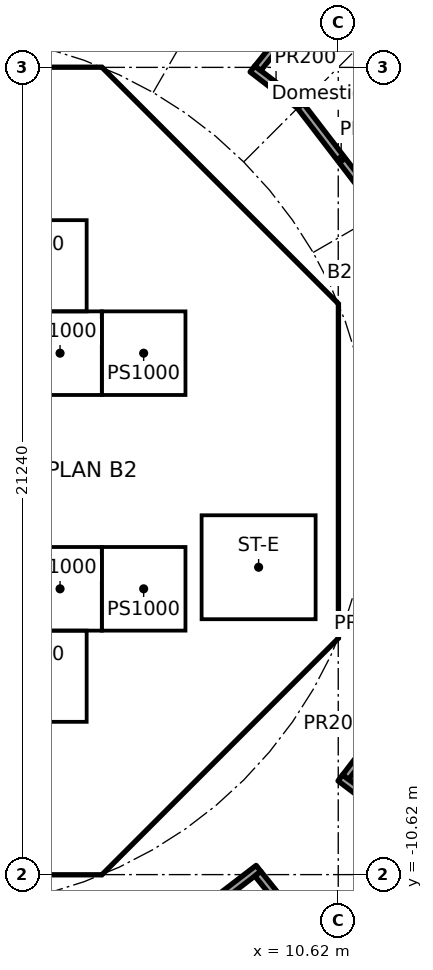
"""IFC4 building model, lengths in metres.
Left out: names, types, materials, properties, quantities, classifications, styles, units other than length and angle.
Written with IfcOpenShell. Run it as: python <this file> out.ifc"""

import sys

from ifc_helpers import new_model, si_unit, direction, frame, frame_2d, origin, place, context, subcontext, project, spatial, polyline, rectangle, outline, extrude, element, fill, save


model = new_model("IFC4")
c1 = context("Model", 3, precision=1e-05, world=origin(), true_north=direction((0.0, 1.0)))
c2 = subcontext(c1, "Body", "Model", "MODEL_VIEW")
j1 = project(units=[si_unit("LENGTHUNIT", "METRE"), si_unit("PLANEANGLEUNIT", "RADIAN")], contexts=[c1])
p1 = place(None, origin())
s1 = spatial("IfcSite", under=j1, at=p1, CompositionType="ELEMENT")
p2 = place(p1, origin())
s2 = spatial("IfcBuilding", under=s1, at=p2, CompositionType="ELEMENT")
p3 = place(p2, frame((0.0, 0.0, -10.0)))
s3 = spatial("IfcBuildingStorey", under=s2, at=p3, CompositionType="ELEMENT", Elevation=-10.0)
p4 = place(p3, frame((9.988, 4.613, 0.0), z_axis=(0.0, 0.0, 1.0), x_axis=(-0.707106781187, 0.707106781187, 0.0)))
e1 = element("IfcWall", 1, at=p4, inside=s3, PredefinedType="SHEAR", context=c2, shape_type="SweptSolid", body=[
    extrude(rectangle(XDim=7.602, YDim=0.6, at=frame_2d((3.801, 0.0))), origin(), (0.0, 0.0, 1.0), 4.6),
])
p5 = place(p4, frame((3.201, 0.0, 0.0)))
e2 = element("IfcOpeningElement", 2, at=p5, cuts=e1, PredefinedType="OPENING", context=c2, shape_type="SweptSolid", body=[
    extrude(rectangle(XDim=1.2, YDim=2.1, at=frame_2d((0.6, 1.05))), frame((0.0, 0.31, 0.0), z_axis=(0.0, -1.0, 0.0), x_axis=(1.0, 0.0, 0.0)), (0.0, 0.0, 1.0), 0.62),
])
p6 = place(p3, frame((4.613, -9.988, 0.0), z_axis=(0.0, 0.0, 1.0), x_axis=(0.707106781187, 0.707106781187, 0.0)))
e3 = element("IfcWall", 3, at=p6, inside=s3, PredefinedType="SHEAR", context=c2, shape_type="SweptSolid", body=[
    extrude(rectangle(XDim=7.602, YDim=0.6, at=frame_2d((3.801, 0.0))), origin(), (0.0, 0.0, 1.0), 4.6),
])
p7 = place(p6, frame((3.201, 0.0, 0.0)))
e4 = element("IfcOpeningElement", 4, at=p7, cuts=e3, PredefinedType="OPENING", context=c2, shape_type="SweptSolid", body=[
    extrude(rectangle(XDim=1.2, YDim=2.1, at=frame_2d((0.6, 1.05))), frame((0.0, 0.31, 0.0), z_axis=(0.0, -1.0, 0.0), x_axis=(1.0, 0.0, 0.0)), (0.0, 0.0, 1.0), 0.62),
])
p8 = place(p3, frame((4.0, 4.3, 0.0), z_axis=(0.0, 0.0, 1.0), x_axis=(0.0, 1.0, 0.0)))
e5 = element("IfcWall", 5, at=p8, inside=s3, PredefinedType="SOLIDWALL", context=c2, shape_type="SweptSolid", body=[
    extrude(rectangle(XDim=2.2, YDim=0.2, at=frame_2d((1.1, 0.0))), origin(), (0.0, 0.0, 1.0), 4.6),
])
p9 = place(p8, frame((0.55, 0.0, 0.0)))
e6 = element("IfcOpeningElement", 6, at=p9, cuts=e5, PredefinedType="OPENING", context=c2, shape_type="SweptSolid", body=[
    extrude(rectangle(XDim=1.1, YDim=2.1, at=frame_2d((0.55, 1.05))), frame((0.0, 0.11, 0.0), z_axis=(0.0, -1.0, 0.0), x_axis=(1.0, 0.0, 0.0)), (0.0, 0.0, 1.0), 0.22),
])
p10 = place(p3, frame((-6.7, 2.0, 0.0), z_axis=(0.0, 0.0, 1.0), x_axis=(1.0, 0.0, 0.0)))
e7 = element("IfcWall", 7, at=p10, inside=s3, PredefinedType="SOLIDWALL", context=c2, shape_type="SweptSolid", body=[
    extrude(rectangle(XDim=13.4, YDim=0.2, at=frame_2d((6.7, 0.0))), origin(), (0.0, 0.0, 1.0), 4.6),
])
p11 = place(p10, frame((0.65, 0.0, 0.0)))
e8 = element("IfcOpeningElement", 8, at=p11, cuts=e7, PredefinedType="OPENING", context=c2, shape_type="SweptSolid", body=[
    extrude(rectangle(XDim=1.1, YDim=2.1, at=frame_2d((0.55, 1.05))), frame((0.0, 0.11, 0.0), z_axis=(0.0, -1.0, 0.0), x_axis=(1.0, 0.0, 0.0)), (0.0, 0.0, 1.0), 0.22),
])
p12 = place(p10, frame((2.85, 0.0, 0.0)))
e9 = element("IfcOpeningElement", 9, at=p12, cuts=e7, PredefinedType="OPENING", context=c2, shape_type="SweptSolid", body=[
    extrude(rectangle(XDim=1.1, YDim=2.1, at=frame_2d((0.55, 1.05))), frame((0.0, 0.11, 0.0), z_axis=(0.0, -1.0, 0.0), x_axis=(1.0, 0.0, 0.0)), (0.0, 0.0, 1.0), 0.22),
])
p13 = place(p10, frame((5.05, 0.0, 0.0)))
e10 = element("IfcOpeningElement", 10, at=p13, cuts=e7, PredefinedType="OPENING", context=c2, shape_type="SweptSolid", body=[
    extrude(rectangle(XDim=1.1, YDim=2.1, at=frame_2d((0.55, 1.05))), frame((0.0, 0.11, 0.0), z_axis=(0.0, -1.0, 0.0), x_axis=(1.0, 0.0, 0.0)), (0.0, 0.0, 1.0), 0.22),
])
p14 = place(p10, frame((7.25, 0.0, 0.0)))
e11 = element("IfcOpeningElement", 11, at=p14, cuts=e7, PredefinedType="OPENING", context=c2, shape_type="SweptSolid", body=[
    extrude(rectangle(XDim=1.1, YDim=2.1, at=frame_2d((0.55, 1.05))), frame((0.0, 0.11, 0.0), z_axis=(0.0, -1.0, 0.0), x_axis=(1.0, 0.0, 0.0)), (0.0, 0.0, 1.0), 0.22),
])
p15 = place(p10, frame((9.45, 0.0, 0.0)))
e12 = element("IfcOpeningElement", 12, at=p15, cuts=e7, PredefinedType="OPENING", context=c2, shape_type="SweptSolid", body=[
    extrude(rectangle(XDim=1.1, YDim=2.1, at=frame_2d((0.55, 1.05))), frame((0.0, 0.11, 0.0), z_axis=(0.0, -1.0, 0.0), x_axis=(1.0, 0.0, 0.0)), (0.0, 0.0, 1.0), 0.22),
])
p16 = place(p10, frame((11.65, 0.0, 0.0)))
e13 = element("IfcOpeningElement", 13, at=p16, cuts=e7, PredefinedType="OPENING", context=c2, shape_type="SweptSolid", body=[
    extrude(rectangle(XDim=1.1, YDim=2.1, at=frame_2d((0.55, 1.05))), frame((0.0, 0.11, 0.0), z_axis=(0.0, -1.0, 0.0), x_axis=(1.0, 0.0, 0.0)), (0.0, 0.0, 1.0), 0.22),
])
p17 = place(p3, frame((6.7, 4.0, 0.0), z_axis=(0.0, 0.0, 1.0), x_axis=(1.0, 0.0, 0.0)))
e14 = element("IfcWall", 14, at=p17, inside=s3, PredefinedType="SOLIDWALL", context=c2, shape_type="SweptSolid", body=[
    extrude(rectangle(XDim=3.325, YDim=0.2, at=frame_2d((1.662, 0.0))), origin(), (0.0, 0.0, 1.0), 4.6),
])
p18 = place(p17, frame((1.25, 0.0, 0.0)))
e15 = element("IfcOpeningElement", 15, at=p18, cuts=e14, PredefinedType="OPENING", context=c2, shape_type="SweptSolid", body=[
    extrude(rectangle(XDim=1.1, YDim=2.1, at=frame_2d((0.55, 1.05))), frame((0.0, 0.11, 0.0), z_axis=(0.0, -1.0, 0.0), x_axis=(1.0, 0.0, 0.0)), (0.0, 0.0, 1.0), 0.22),
])
p19 = place(p3, frame((4.0, 7.025, 0.0), z_axis=(0.0, 0.0, 1.0), x_axis=(0.0, 1.0, 0.0)))
e16 = element("IfcWall", 16, at=p19, inside=s3, PredefinedType="SOLIDWALL", context=c2, shape_type="SweptSolid", body=[
    extrude(rectangle(XDim=3.0, YDim=0.2, at=frame_2d((1.5, 0.0))), origin(), (0.0, 0.0, 1.0), 4.6),
])
p20 = place(p19, frame((0.925, 0.0, 0.0)))
e17 = element("IfcOpeningElement", 17, at=p20, cuts=e16, PredefinedType="OPENING", context=c2, shape_type="SweptSolid", body=[
    extrude(rectangle(XDim=1.1, YDim=2.1, at=frame_2d((0.55, 1.05))), frame((0.0, 0.11, 0.0), z_axis=(0.0, -1.0, 0.0), x_axis=(1.0, 0.0, 0.0)), (0.0, 0.0, 1.0), 0.22),
])
p21 = place(p3, frame((4.0, -10.025, 0.0), z_axis=(0.0, 0.0, 1.0), x_axis=(0.0, 1.0, 0.0)))
e18 = element("IfcWall", 18, at=p21, inside=s3, PredefinedType="SOLIDWALL", context=c2, shape_type="SweptSolid", body=[
    extrude(rectangle(XDim=3.0, YDim=0.2, at=frame_2d((1.5, 0.0))), origin(), (0.0, 0.0, 1.0), 4.6),
])
p22 = place(p21, frame((0.975, 0.0, 0.0)))
e19 = element("IfcOpeningElement", 19, at=p22, cuts=e18, PredefinedType="OPENING", context=c2, shape_type="SweptSolid", body=[
    extrude(rectangle(XDim=1.1, YDim=2.1, at=frame_2d((0.55, 1.05))), frame((0.0, 0.11, 0.0), z_axis=(0.0, -1.0, 0.0), x_axis=(1.0, 0.0, 0.0)), (0.0, 0.0, 1.0), 0.22),
])
p23 = place(p3, frame((4.0, -6.5, 0.0), z_axis=(0.0, 0.0, 1.0), x_axis=(0.0, 1.0, 0.0)))
e20 = element("IfcWall", 20, at=p23, inside=s3, PredefinedType="SOLIDWALL", context=c2, shape_type="SweptSolid", body=[
    extrude(rectangle(XDim=2.2, YDim=0.2, at=frame_2d((1.1, 0.0))), origin(), (0.0, 0.0, 1.0), 4.6),
])
p24 = place(p23, frame((0.55, 0.0, 0.0)))
e21 = element("IfcOpeningElement", 21, at=p24, cuts=e20, PredefinedType="OPENING", context=c2, shape_type="SweptSolid", body=[
    extrude(rectangle(XDim=1.1, YDim=2.1, at=frame_2d((0.55, 1.05))), frame((0.0, 0.11, 0.0), z_axis=(0.0, -1.0, 0.0), x_axis=(1.0, 0.0, 0.0)), (0.0, 0.0, 1.0), 0.22),
])
p25 = place(p3, frame((-6.7, -2.0, 0.0), z_axis=(0.0, 0.0, 1.0), x_axis=(1.0, 0.0, 0.0)))
e22 = element("IfcWall", 22, at=p25, inside=s3, PredefinedType="SOLIDWALL", context=c2, shape_type="SweptSolid", body=[
    extrude(rectangle(XDim=13.4, YDim=0.2, at=frame_2d((6.7, 0.0))), origin(), (0.0, 0.0, 1.0), 4.6),
])
p26 = place(p25, frame((0.65, 0.0, 0.0)))
e23 = element("IfcOpeningElement", 23, at=p26, cuts=e22, PredefinedType="OPENING", context=c2, shape_type="SweptSolid", body=[
    extrude(rectangle(XDim=1.1, YDim=2.1, at=frame_2d((0.55, 1.05))), frame((0.0, 0.11, 0.0), z_axis=(0.0, -1.0, 0.0), x_axis=(1.0, 0.0, 0.0)), (0.0, 0.0, 1.0), 0.22),
])
p27 = place(p25, frame((2.85, 0.0, 0.0)))
e24 = element("IfcOpeningElement", 24, at=p27, cuts=e22, PredefinedType="OPENING", context=c2, shape_type="SweptSolid", body=[
    extrude(rectangle(XDim=1.1, YDim=2.1, at=frame_2d((0.55, 1.05))), frame((0.0, 0.11, 0.0), z_axis=(0.0, -1.0, 0.0), x_axis=(1.0, 0.0, 0.0)), (0.0, 0.0, 1.0), 0.22),
])
p28 = place(p25, frame((5.05, 0.0, 0.0)))
e25 = element("IfcOpeningElement", 25, at=p28, cuts=e22, PredefinedType="OPENING", context=c2, shape_type="SweptSolid", body=[
    extrude(rectangle(XDim=1.1, YDim=2.1, at=frame_2d((0.55, 1.05))), frame((0.0, 0.11, 0.0), z_axis=(0.0, -1.0, 0.0), x_axis=(1.0, 0.0, 0.0)), (0.0, 0.0, 1.0), 0.22),
])
p29 = place(p25, frame((7.25, 0.0, 0.0)))
e26 = element("IfcOpeningElement", 26, at=p29, cuts=e22, PredefinedType="OPENING", context=c2, shape_type="SweptSolid", body=[
    extrude(rectangle(XDim=1.1, YDim=2.1, at=frame_2d((0.55, 1.05))), frame((0.0, 0.11, 0.0), z_axis=(0.0, -1.0, 0.0), x_axis=(1.0, 0.0, 0.0)), (0.0, 0.0, 1.0), 0.22),
])
p30 = place(p25, frame((9.45, 0.0, 0.0)))
e27 = element("IfcOpeningElement", 27, at=p30, cuts=e22, PredefinedType="OPENING", context=c2, shape_type="SweptSolid", body=[
    extrude(rectangle(XDim=1.1, YDim=2.1, at=frame_2d((0.55, 1.05))), frame((0.0, 0.11, 0.0), z_axis=(0.0, -1.0, 0.0), x_axis=(1.0, 0.0, 0.0)), (0.0, 0.0, 1.0), 0.22),
])
p31 = place(p25, frame((11.65, 0.0, 0.0)))
e28 = element("IfcOpeningElement", 28, at=p31, cuts=e22, PredefinedType="OPENING", context=c2, shape_type="SweptSolid", body=[
    extrude(rectangle(XDim=1.1, YDim=2.1, at=frame_2d((0.55, 1.05))), frame((0.0, 0.11, 0.0), z_axis=(0.0, -1.0, 0.0), x_axis=(1.0, 0.0, 0.0)), (0.0, 0.0, 1.0), 0.22),
])
p32 = place(p3, origin())
e29 = element("IfcWall", 29, at=p32, inside=s3, PredefinedType="SHEAR", context=c2, shape_type="SweptSolid", body=[
    extrude(outline(polyline([(-4.152, -10.025), (4.152, -10.025), (4.401, -9.776), (4.825, -10.2), (4.401, -10.625), (-4.401, -10.625), (-4.825, -10.2), (-4.401, -9.776), (-4.152, -10.025)])), origin(), (0.0, 0.0, 1.0), 4.6),
])
p33 = place(p3, origin())
e30 = element("IfcWall", 30, at=p33, inside=s3, PredefinedType="SHEAR", context=c2, shape_type="SweptSolid", body=[
    extrude(outline(polyline([(-4.152, 10.025), (-4.401, 9.776), (-4.825, 10.2), (-4.401, 10.625), (4.401, 10.625), (4.825, 10.2), (4.401, 9.776), (4.152, 10.025), (-4.152, 10.025)])), origin(), (0.0, 0.0, 1.0), 4.6),
])
p34 = place(p3, origin())
e31 = element("IfcWall", 31, at=p34, inside=s3, PredefinedType="SHEAR", context=c2, shape_type="SweptSolid", body=[
    extrude(outline(polyline([(9.776, -4.401), (10.025, -4.152), (10.025, -3.801), (10.025, 4.152), (9.776, 4.401), (10.2, 4.825), (10.625, 4.401), (10.625, -4.401), (10.2, -4.825), (9.776, -4.401)])), origin(), (0.0, 0.0, 1.0), 4.6),
])
p35 = place(p3, origin())
e32 = element("IfcWall", 32, at=p35, inside=s3, PredefinedType="SOLIDWALL", context=c2, shape_type="SweptSolid", body=[
    extrude(outline(polyline([(-6.7, -2.1), (-6.5, -2.1), (-6.5, -4.1), (-4.5, -4.1), (-4.5, -2.1), (-4.3, -2.1), (-4.3, -4.1), (-2.3, -4.1), (-2.3, -2.1), (-2.1, -2.1), (-2.1, -4.1), (-0.1, -4.1), (-0.1, -2.1), (0.1, -2.1), (0.1, -4.1), (2.1, -4.1), (2.1, -2.1), (2.3, -2.1), (2.3, -4.1), (4.3, -4.1), (4.3, -2.1), (4.5, -2.1), (4.5, -4.1), (6.5, -4.1), (6.5, -2.1), (6.7, -2.1), (6.7, -4.3), (-6.7, -4.3), (-6.7, -2.1)])), origin(), (0.0, 0.0, 1.0), 4.6),
])
p36 = place(p3, origin())
e33 = element("IfcWall", 33, at=p36, inside=s3, PredefinedType="SOLIDWALL", context=c2, shape_type="SweptSolid", body=[
    extrude(outline(polyline([(-6.5, 2.1), (-6.7, 2.1), (-6.7, 4.3), (6.7, 4.3), (6.7, 2.1), (6.5, 2.1), (6.5, 4.1), (4.5, 4.1), (4.5, 2.1), (4.3, 2.1), (4.3, 4.1), (2.3, 4.1), (2.3, 2.1), (2.1, 2.1), (2.1, 4.1), (0.1, 4.1), (0.1, 2.1), (-0.1, 2.1), (-0.1, 4.1), (-2.1, 4.1), (-2.1, 2.1), (-2.3, 2.1), (-2.3, 4.1), (-4.3, 4.1), (-4.3, 2.1), (-4.5, 2.1), (-4.5, 4.1), (-6.5, 4.1), (-6.5, 2.1)])), origin(), (0.0, 0.0, 1.0), 4.6),
])
p37 = place(p3, origin())
e34 = element("IfcWall", 34, at=p37, inside=s3, PredefinedType="SOLIDWALL", context=c2, shape_type="SweptSolid", body=[
    extrude(outline(polyline([(4.1, -7.025), (-4.1, -7.025), (-4.1, -6.5), (4.1, -6.5), (4.1, -7.025)])), origin(), (0.0, 0.0, 1.0), 4.6),
])
p38 = place(p3, origin())
e35 = element("IfcWall", 35, at=p38, inside=s3, PredefinedType="SOLIDWALL", context=c2, shape_type="SweptSolid", body=[
    extrude(outline(polyline([(4.1, 6.5), (-4.1, 6.5), (-4.1, 7.025), (4.1, 7.025), (4.1, 6.5)])), origin(), (0.0, 0.0, 1.0), 4.6),
])
p39 = place(p3, origin())
e36 = element("IfcWall", 36, at=p39, inside=s3, PredefinedType="SOLIDWALL", context=c2, shape_type="SweptSolid", body=[
    extrude(outline(polyline([(7.025, -3.9), (6.7, -3.9), (6.7, 3.9), (7.025, 3.9), (7.025, -3.9)])), origin(), (0.0, 0.0, 1.0), 4.6),
])
p40 = place(p3, origin())
e37 = element("IfcWall", 37, at=p40, inside=s3, PredefinedType="SOLIDWALL", context=c2, shape_type="SweptSolid", body=[
    extrude(outline(polyline([(10.025, -4.1), (6.7, -4.1), (6.7, -3.9), (10.025, -3.9), (10.025, -4.1)])), origin(), (0.0, 0.0, 1.0), 4.6),
])
p41 = place(p3, frame((0.0, 0.0, -2.0)))
e38 = element("IfcWall", 38, at=p41, inside=s3, PredefinedType="SOLIDWALL", context=c2, shape_type="SweptSolid", body=[
    extrude(outline(polyline([(4.4, 2.0), (2.2, 2.0), (2.2, 4.2), (4.4, 4.2), (4.4, 2.0)]), holes=[polyline([(4.3, 2.1), (4.3, 4.1), (2.3, 4.1), (2.3, 2.1), (4.3, 2.1)])]), origin(), (0.0, 0.0, 1.0), 2.0),
])
p42 = place(p3, frame((0.0, 0.0, -2.0)))
e39 = element("IfcWall", 39, at=p42, inside=s3, PredefinedType="SOLIDWALL", context=c2, shape_type="SweptSolid", body=[
    extrude(outline(polyline([(6.6, 2.0), (4.4, 2.0), (4.4, 4.2), (6.6, 4.2), (6.6, 2.0)]), holes=[polyline([(6.5, 2.1), (6.5, 4.1), (4.5, 4.1), (4.5, 2.1), (6.5, 2.1)])]), origin(), (0.0, 0.0, 1.0), 2.0),
])
p43 = place(p3, frame((0.0, 0.0, -2.0)))
e40 = element("IfcWall", 40, at=p43, inside=s3, PredefinedType="SOLIDWALL", context=c2, shape_type="SweptSolid", body=[
    extrude(outline(polyline([(4.4, -4.2), (2.2, -4.2), (2.2, -2.0), (4.4, -2.0), (4.4, -4.2)]), holes=[polyline([(4.3, -4.1), (4.3, -2.1), (2.3, -2.1), (2.3, -4.1), (4.3, -4.1)])]), origin(), (0.0, 0.0, 1.0), 2.0),
])
p44 = place(p3, frame((0.0, 0.0, -2.0)))
e41 = element("IfcWall", 41, at=p44, inside=s3, PredefinedType="SOLIDWALL", context=c2, shape_type="SweptSolid", body=[
    extrude(outline(polyline([(6.6, -4.2), (4.4, -4.2), (4.4, -2.0), (6.6, -2.0), (6.6, -4.2)]), holes=[polyline([(6.5, -4.1), (6.5, -2.1), (4.5, -2.1), (4.5, -4.1), (6.5, -4.1)])]), origin(), (0.0, 0.0, 1.0), 2.0),
])
p45 = place(p3, frame((0.0, 0.0, -2.0)))
e42 = element("IfcWall", 42, at=p45, inside=s3, PredefinedType="SOLIDWALL", context=c2, shape_type="SweptSolid", body=[
    extrude(outline(polyline([(4.0, 4.2), (0.9, 4.2), (0.9, 6.6), (4.0, 6.6), (4.0, 4.2)]), holes=[polyline([(3.9, 4.3), (3.9, 6.5), (1.0, 6.5), (1.0, 4.3), (3.9, 4.3)])]), origin(), (0.0, 0.0, 1.0), 2.0),
])
p46 = place(p3, frame((0.0, 0.0, -2.0)))
e43 = element("IfcWall", 43, at=p46, inside=s3, PredefinedType="SOLIDWALL", context=c2, shape_type="SweptSolid", body=[
    extrude(outline(polyline([(4.0, -6.6), (0.9, -6.6), (0.9, -4.2), (4.0, -4.2), (4.0, -6.6)]), holes=[polyline([(3.9, -6.5), (3.9, -4.3), (1.0, -4.3), (1.0, -6.5), (3.9, -6.5)])]), origin(), (0.0, 0.0, 1.0), 2.0),
])
p47 = place(p3, frame((8.521, -10.457, 0.0), z_axis=(0.0, 0.0, 1.0), x_axis=(-0.793411148419, -0.608686084582, 0.0)))
e44 = element("IfcWall", 44, at=p47, inside=s3, PredefinedType="PARTITIONING", context=c2, shape_type="SweptSolid", body=[
    extrude(rectangle(XDim=2.154, YDim=0.2, at=frame_2d((1.077, 0.0))), origin(), (0.0, 0.0, 1.0), 4.6),
])
p48 = place(p3, frame((8.363, 10.579, 0.0), z_axis=(0.0, 0.0, 1.0), x_axis=(0.793365367908, -0.608745753992, 0.0)))
e45 = element("IfcWall", 45, at=p48, inside=s3, PredefinedType="PARTITIONING", context=c2, shape_type="SweptSolid", body=[
    extrude(rectangle(XDim=1.566, YDim=0.2, at=frame_2d((0.783, 0.0))), origin(), (0.0, 0.0, 1.0), 4.6),
])
p49 = place(p3, frame((9.626, 9.605, 0.0), z_axis=(0.0, 0.0, 1.0), x_axis=(0.608697977542, -0.793402024283, 0.0)))
e46 = element("IfcWall", 46, at=p49, inside=s3, PredefinedType="PARTITIONING", context=c2, shape_type="SweptSolid", body=[
    extrude(rectangle(XDim=3.52, YDim=0.2, at=frame_2d((1.76, 0.0))), origin(), (0.0, 0.0, 1.0), 4.6),
])
p50 = place(p3, frame((10.675, -8.073, 0.0), z_axis=(0.0, 0.0, 1.0), x_axis=(0.797578930951, -0.603214596062, 0.0)))
e47 = element("IfcWall", 47, at=p50, inside=s3, PredefinedType="PARTITIONING", context=c2, shape_type="SweptSolid", body=[
    extrude(rectangle(XDim=6.2, YDim=0.2, at=frame_2d((3.1, 0.0))), origin(), (0.0, 0.0, 1.0), 4.6),
])
p51 = place(p3, frame((11.769, -6.812, 0.0), z_axis=(0.0, 0.0, 1.0), x_axis=(-0.608670453571, -0.793423139913, 0.0)))
e48 = element("IfcWall", 48, at=p51, inside=s3, PredefinedType="PARTITIONING", context=c2, shape_type="SweptSolid", body=[
    extrude(rectangle(XDim=1.566, YDim=0.2, at=frame_2d((0.783, 0.0))), origin(), (0.0, 0.0, 1.0), 4.6),
])
p52 = place(p3, frame((12.136, -15.121, 0.0), z_axis=(0.0, 0.0, 1.0), x_axis=(-0.625936206577, 0.779874262491, 0.0)))
e49 = element("IfcWall", 49, at=p52, inside=s3, PredefinedType="PARTITIONING", context=c2, shape_type="SweptSolid", body=[
    extrude(rectangle(XDim=5.802, YDim=0.2, at=frame_2d((2.901, 0.0))), origin(), (0.0, 0.0, 1.0), 4.6),
])
p53 = place(p3, frame((12.261, 15.277, 0.0), z_axis=(0.0, 0.0, 1.0), x_axis=(-0.625939450801, -0.779871658628, 0.0)))
e50 = element("IfcWall", 50, at=p53, inside=s3, PredefinedType="PARTITIONING", context=c2, shape_type="SweptSolid", body=[
    extrude(rectangle(XDim=6.001, YDim=0.2, at=frame_2d((3.001, 0.0))), origin(), (0.0, 0.0, 1.0), 4.6),
])
p54 = place(p15, origin())
e51 = element("IfcDoor", 51, at=p54, inside=s3, OperationType="DOUBLE_DOOR_SLIDING", PredefinedType="DOOR", context=c2, shape_type="SweptSolid", body=[
    extrude(rectangle(XDim=1.1, YDim=2.1, at=frame_2d((0.55, 1.05))), frame((0.0, 0.025, 0.0), z_axis=(0.0, -1.0, 0.0), x_axis=(1.0, 0.0, 0.0)), (0.0, 0.0, 1.0), 0.05),
])
fill(e12, e51)
p55 = place(p16, origin())
e52 = element("IfcDoor", 52, at=p55, inside=s3, OperationType="DOUBLE_DOOR_SLIDING", PredefinedType="DOOR", context=c2, shape_type="SweptSolid", body=[
    extrude(rectangle(XDim=1.1, YDim=2.1, at=frame_2d((0.55, 1.05))), frame((0.0, 0.025, 0.0), z_axis=(0.0, -1.0, 0.0), x_axis=(1.0, 0.0, 0.0)), (0.0, 0.0, 1.0), 0.05),
])
fill(e13, e52)
p56 = place(p30, origin())
e53 = element("IfcDoor", 53, at=p56, inside=s3, OperationType="DOUBLE_DOOR_SLIDING", PredefinedType="DOOR", context=c2, shape_type="SweptSolid", body=[
    extrude(rectangle(XDim=1.1, YDim=2.1, at=frame_2d((0.55, 1.05))), frame((0.0, 0.025, 0.0), z_axis=(0.0, -1.0, 0.0), x_axis=(1.0, 0.0, 0.0)), (0.0, 0.0, 1.0), 0.05),
])
fill(e27, e53)
p57 = place(p31, origin())
e54 = element("IfcDoor", 54, at=p57, inside=s3, OperationType="DOUBLE_DOOR_SLIDING", PredefinedType="DOOR", context=c2, shape_type="SweptSolid", body=[
    extrude(rectangle(XDim=1.1, YDim=2.1, at=frame_2d((0.55, 1.05))), frame((0.0, 0.025, 0.0), z_axis=(0.0, -1.0, 0.0), x_axis=(1.0, 0.0, 0.0)), (0.0, 0.0, 1.0), 0.05),
])
fill(e28, e54)
p58 = place(p9, origin())
e55 = element("IfcDoor", 55, at=p58, inside=s3, OperationType="DOUBLE_DOOR_SLIDING", PredefinedType="DOOR", context=c2, shape_type="SweptSolid", body=[
    extrude(rectangle(XDim=1.1, YDim=2.1, at=frame_2d((0.55, 1.05))), frame((0.0, 0.025, 0.0), z_axis=(0.0, -1.0, 0.0), x_axis=(1.0, 0.0, 0.0)), (0.0, 0.0, 1.0), 0.05),
])
fill(e6, e55)
p59 = place(p24, origin())
e56 = element("IfcDoor", 56, at=p59, inside=s3, OperationType="DOUBLE_DOOR_SLIDING", PredefinedType="DOOR", context=c2, shape_type="SweptSolid", body=[
    extrude(rectangle(XDim=1.1, YDim=2.1, at=frame_2d((0.55, 1.05))), frame((0.0, 0.025, 0.0), z_axis=(0.0, -1.0, 0.0), x_axis=(1.0, 0.0, 0.0)), (0.0, 0.0, 1.0), 0.05),
])
fill(e21, e56)
p60 = place(p18, frame((1.1, 0.0, 0.0), x_axis=(-1.0, 0.0, 0.0)))
e57 = element("IfcDoor", 57, at=p60, inside=s3, OperationType="SINGLE_SWING_RIGHT", PredefinedType="DOOR", context=c2, shape_type="SweptSolid", body=[
    extrude(rectangle(XDim=1.1, YDim=2.1, at=frame_2d((0.55, 1.05))), frame((0.0, 0.025, 0.0), z_axis=(0.0, -1.0, 0.0), x_axis=(1.0, 0.0, 0.0)), (0.0, 0.0, 1.0), 0.05),
])
fill(e15, e57)
p61 = place(p20, origin())
e58 = element("IfcDoor", 58, at=p61, inside=s3, OperationType="SINGLE_SWING_LEFT", PredefinedType="DOOR", context=c2, shape_type="SweptSolid", body=[
    extrude(rectangle(XDim=1.1, YDim=2.1, at=frame_2d((0.55, 1.05))), frame((0.0, 0.025, 0.0), z_axis=(0.0, -1.0, 0.0), x_axis=(1.0, 0.0, 0.0)), (0.0, 0.0, 1.0), 0.05),
])
fill(e17, e58)
p62 = place(p22, origin())
e59 = element("IfcDoor", 59, at=p62, inside=s3, OperationType="SINGLE_SWING_RIGHT", PredefinedType="DOOR", context=c2, shape_type="SweptSolid", body=[
    extrude(rectangle(XDim=1.1, YDim=2.1, at=frame_2d((0.55, 1.05))), frame((0.0, 0.025, 0.0), z_axis=(0.0, -1.0, 0.0), x_axis=(1.0, 0.0, 0.0)), (0.0, 0.0, 1.0), 0.05),
])
fill(e19, e59)
p63 = place(p5, origin())
e60 = element("IfcDoor", 60, at=p63, inside=s3, OperationType="SINGLE_SWING_LEFT", PredefinedType="DOOR", context=c2, shape_type="SweptSolid", body=[
    extrude(rectangle(XDim=1.2, YDim=2.1, at=frame_2d((0.6, 1.05))), frame((0.0, 0.025, 0.0), z_axis=(0.0, -1.0, 0.0), x_axis=(1.0, 0.0, 0.0)), (0.0, 0.0, 1.0), 0.05),
])
fill(e2, e60)
p64 = place(p7, origin())
e61 = element("IfcDoor", 61, at=p64, inside=s3, OperationType="SINGLE_SWING_LEFT", PredefinedType="DOOR", context=c2, shape_type="SweptSolid", body=[
    extrude(rectangle(XDim=1.2, YDim=2.1, at=frame_2d((0.6, 1.05))), frame((0.0, 0.025, 0.0), z_axis=(0.0, -1.0, 0.0), x_axis=(1.0, 0.0, 0.0)), (0.0, 0.0, 1.0), 0.05),
])
fill(e4, e61)
save(model, sys.argv[1])
